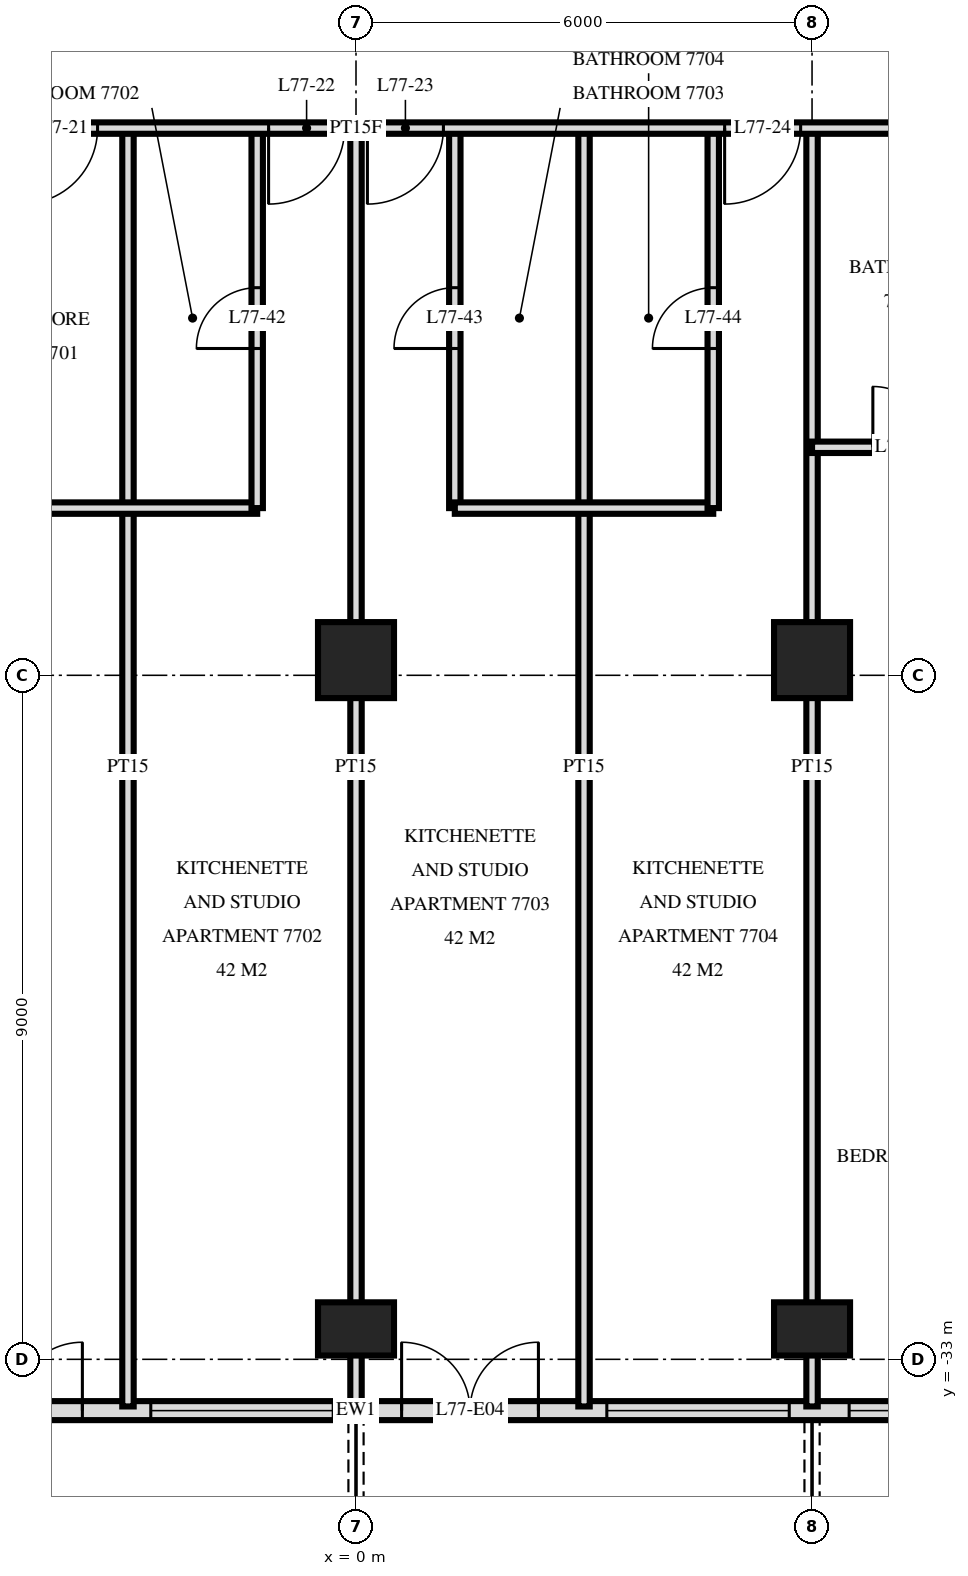
"""IFC4 building model, lengths in metres.
Left out: names, types, materials, properties, quantities, classifications, styles, units other than length and angle.
Written with IfcOpenShell. Run it as: python <this file> out.ifc"""

import sys

from ifc_helpers import new_model, si_unit, direction, frame, frame_2d, origin, origin_2d, place, context, subcontext, project, spatial, rectangle, extrude, element, fill, save


model = new_model("IFC4")
c1 = context("Model", 3, precision=1e-05, world=origin(), true_north=direction((0.0, 1.0)))
c2 = subcontext(c1, "Body", "Model", "MODEL_VIEW")
j1 = project(units=[si_unit("LENGTHUNIT", "METRE"), si_unit("PLANEANGLEUNIT", "RADIAN")], contexts=[c1])
p1 = place(None, origin())
s1 = spatial("IfcSite", under=j1, at=p1, CompositionType="ELEMENT")
p2 = place(p1, origin())
s2 = spatial("IfcBuilding", under=s1, at=p2, CompositionType="ELEMENT")
p3 = place(p2, frame((0.0, 0.0, 291.1)))
s3 = spatial("IfcBuildingStorey", under=s2, at=p3, CompositionType="ELEMENT", Elevation=291.1)
p4 = place(p3, frame((0.0, -32.6, 0.0), z_axis=(0.0, 0.0, 1.0), x_axis=(1.0, 0.0, 0.0)))
e1 = element("IfcColumn", 1, at=p4, inside=s3, PredefinedType="COLUMN", context=c2, shape_type="SweptSolid", body=[
    extrude(rectangle(XDim=1.0, YDim=0.7, at=origin_2d()), origin(), (0.0, 0.0, 1.0), 3.5),
])
p5 = place(p3, frame((0.0, -23.8, 0.0), z_axis=(0.0, 0.0, 1.0), x_axis=(1.0, 0.0, 0.0)))
e2 = element("IfcColumn", 2, at=p5, inside=s3, PredefinedType="COLUMN", context=c2, shape_type="SweptSolid", body=[
    extrude(rectangle(XDim=1.0, YDim=1.0, at=origin_2d()), origin(), (0.0, 0.0, 1.0), 3.5),
])
p6 = place(p3, frame((6.0, -32.6, 0.0), z_axis=(0.0, 0.0, 1.0), x_axis=(1.0, 0.0, 0.0)))
e3 = element("IfcColumn", 3, at=p6, inside=s3, PredefinedType="COLUMN", context=c2, shape_type="SweptSolid", body=[
    extrude(rectangle(XDim=1.0, YDim=0.7, at=origin_2d()), origin(), (0.0, 0.0, 1.0), 3.5),
])
p7 = place(p3, frame((6.0, -23.8, 0.0), z_axis=(0.0, 0.0, 1.0), x_axis=(1.0, 0.0, 0.0)))
e4 = element("IfcColumn", 4, at=p7, inside=s3, PredefinedType="COLUMN", context=c2, shape_type="SweptSolid", body=[
    extrude(rectangle(XDim=1.0, YDim=1.0, at=origin_2d()), origin(), (0.0, 0.0, 1.0), 3.5),
])
p8 = place(p3, frame((-18.575, -33.675, 0.0), z_axis=(0.0, 0.0, 1.0), x_axis=(1.0, 0.0, 0.0)))
e5 = element("IfcWall", 5, at=p8, inside=s3, PredefinedType="SOLIDWALL", context=c2, shape_type="SweptSolid", body=[
    extrude(rectangle(XDim=37.151, YDim=0.25, at=frame_2d((18.575, 0.0))), origin(), (0.0, 0.0, 1.0), 3.22),
])
p9 = place(p8, frame((1.175, 0.0, 0.0)))
e6 = element("IfcOpeningElement", 6, at=p9, cuts=e5, PredefinedType="OPENING", context=c2, shape_type="SweptSolid", body=[
    extrude(rectangle(XDim=1.8, YDim=2.4, at=frame_2d((0.9, 1.2))), frame((0.0, 0.135, 0.0), z_axis=(0.0, -1.0, 0.0), x_axis=(1.0, 0.0, 0.0)), (0.0, 0.0, 1.0), 0.27),
])
p10 = place(p8, frame((4.4, 0.0, 0.9)))
e7 = element("IfcOpeningElement", 7, at=p10, cuts=e5, PredefinedType="OPENING", context=c2, shape_type="SweptSolid", body=[
    extrude(rectangle(XDim=1.8, YDim=1.5, at=frame_2d((0.9, 0.75))), frame((0.0, 0.135, 0.0), z_axis=(0.0, -1.0, 0.0), x_axis=(1.0, 0.0, 0.0)), (0.0, 0.0, 1.0), 0.27),
])
p11 = place(p8, frame((6.875, 0.0, 0.9)))
e8 = element("IfcOpeningElement", 8, at=p11, cuts=e5, PredefinedType="OPENING", context=c2, shape_type="SweptSolid", body=[
    extrude(rectangle(XDim=2.4, YDim=1.5, at=frame_2d((1.2, 0.75))), frame((0.0, 0.135, 0.0), z_axis=(0.0, -1.0, 0.0), x_axis=(1.0, 0.0, 0.0)), (0.0, 0.0, 1.0), 0.27),
])
p12 = place(p8, frame((10.175, 0.0, 0.0)))
e9 = element("IfcOpeningElement", 9, at=p12, cuts=e5, PredefinedType="OPENING", context=c2, shape_type="SweptSolid", body=[
    extrude(rectangle(XDim=1.8, YDim=2.4, at=frame_2d((0.9, 1.2))), frame((0.0, 0.135, 0.0), z_axis=(0.0, -1.0, 0.0), x_axis=(1.0, 0.0, 0.0)), (0.0, 0.0, 1.0), 0.27),
])
p13 = place(p8, frame((13.175, 0.0, 0.0)))
e10 = element("IfcOpeningElement", 10, at=p13, cuts=e5, PredefinedType="OPENING", context=c2, shape_type="SweptSolid", body=[
    extrude(rectangle(XDim=1.8, YDim=2.4, at=frame_2d((0.9, 1.2))), frame((0.0, 0.135, 0.0), z_axis=(0.0, -1.0, 0.0), x_axis=(1.0, 0.0, 0.0)), (0.0, 0.0, 1.0), 0.27),
])
p14 = place(p8, frame((15.875, 0.0, 0.9)))
e11 = element("IfcOpeningElement", 11, at=p14, cuts=e5, PredefinedType="OPENING", context=c2, shape_type="SweptSolid", body=[
    extrude(rectangle(XDim=2.4, YDim=1.5, at=frame_2d((1.2, 0.75))), frame((0.0, 0.135, 0.0), z_axis=(0.0, -1.0, 0.0), x_axis=(1.0, 0.0, 0.0)), (0.0, 0.0, 1.0), 0.27),
])
p15 = place(p8, frame((19.175, 0.0, 0.0)))
e12 = element("IfcOpeningElement", 12, at=p15, cuts=e5, PredefinedType="OPENING", context=c2, shape_type="SweptSolid", body=[
    extrude(rectangle(XDim=1.8, YDim=2.4, at=frame_2d((0.9, 1.2))), frame((0.0, 0.135, 0.0), z_axis=(0.0, -1.0, 0.0), x_axis=(1.0, 0.0, 0.0)), (0.0, 0.0, 1.0), 0.27),
])
p16 = place(p8, frame((21.875, 0.0, 0.9)))
e13 = element("IfcOpeningElement", 13, at=p16, cuts=e5, PredefinedType="OPENING", context=c2, shape_type="SweptSolid", body=[
    extrude(rectangle(XDim=2.4, YDim=1.5, at=frame_2d((1.2, 0.75))), frame((0.0, 0.135, 0.0), z_axis=(0.0, -1.0, 0.0), x_axis=(1.0, 0.0, 0.0)), (0.0, 0.0, 1.0), 0.27),
])
p17 = place(p8, frame((25.063, 0.0, 0.9)))
e14 = element("IfcOpeningElement", 14, at=p17, cuts=e5, PredefinedType="OPENING", context=c2, shape_type="SweptSolid", body=[
    extrude(rectangle(XDim=1.8, YDim=1.5, at=frame_2d((0.9, 0.75))), frame((0.0, 0.135, 0.0), z_axis=(0.0, -1.0, 0.0), x_axis=(1.0, 0.0, 0.0)), (0.0, 0.0, 1.0), 0.27),
])
p18 = place(p8, frame((27.838, 0.0, 0.0)))
e15 = element("IfcOpeningElement", 15, at=p18, cuts=e5, PredefinedType="OPENING", context=c2, shape_type="SweptSolid", body=[
    extrude(rectangle(XDim=1.8, YDim=2.4, at=frame_2d((0.9, 1.2))), frame((0.0, 0.135, 0.0), z_axis=(0.0, -1.0, 0.0), x_axis=(1.0, 0.0, 0.0)), (0.0, 0.0, 1.0), 0.27),
])
p19 = place(p8, frame((31.175, 0.0, 0.0)))
e16 = element("IfcOpeningElement", 16, at=p19, cuts=e5, PredefinedType="OPENING", context=c2, shape_type="SweptSolid", body=[
    extrude(rectangle(XDim=1.8, YDim=2.4, at=frame_2d((0.9, 1.2))), frame((0.0, 0.135, 0.0), z_axis=(0.0, -1.0, 0.0), x_axis=(1.0, 0.0, 0.0)), (0.0, 0.0, 1.0), 0.27),
])
p20 = place(p3, frame((6.0, -33.62, 0.0), z_axis=(0.0, 0.0, 1.0), x_axis=(0.0, 1.0, 0.0)))
e17 = element("IfcWall", 17, at=p20, inside=s3, PredefinedType="PARTITIONING", context=c2, shape_type="SweptSolid", body=[
    extrude(rectangle(XDim=16.82, YDim=0.15, at=frame_2d((8.41, 0.0))), origin(), (0.0, 0.0, 1.0), 3.22),
])
p21 = place(p3, frame((4.7, -21.8, 0.0), z_axis=(0.0, 0.0, 1.0), x_axis=(0.0, 1.0, 0.0)))
e18 = element("IfcWall", 18, at=p21, inside=s3, PredefinedType="PARTITIONING", context=c2, shape_type="SweptSolid", body=[
    extrude(rectangle(XDim=5.0, YDim=0.15, at=frame_2d((2.5, 0.0))), origin(), (0.0, 0.0, 1.0), 3.22),
])
p22 = place(p21, frame((2.1, 0.0, 0.0)))
e19 = element("IfcOpeningElement", 19, at=p22, cuts=e18, PredefinedType="OPENING", context=c2, shape_type="SweptSolid", body=[
    extrude(rectangle(XDim=0.8, YDim=2.1, at=frame_2d((0.4, 1.05))), frame((0.0, 0.085, 0.0), z_axis=(0.0, -1.0, 0.0), x_axis=(1.0, 0.0, 0.0)), (0.0, 0.0, 1.0), 0.17),
])
p23 = place(p3, frame((3.0, -33.62, 0.0), z_axis=(0.0, 0.0, 1.0), x_axis=(0.0, 1.0, 0.0)))
e20 = element("IfcWall", 20, at=p23, inside=s3, PredefinedType="PARTITIONING", context=c2, shape_type="SweptSolid", body=[
    extrude(rectangle(XDim=16.82, YDim=0.15, at=frame_2d((8.41, 0.0))), origin(), (0.0, 0.0, 1.0), 3.22),
])
p24 = place(p3, frame((1.3, -21.8, 0.0), z_axis=(0.0, 0.0, 1.0), x_axis=(0.0, 1.0, 0.0)))
e21 = element("IfcWall", 21, at=p24, inside=s3, PredefinedType="PARTITIONING", context=c2, shape_type="SweptSolid", body=[
    extrude(rectangle(XDim=5.0, YDim=0.15, at=frame_2d((2.5, 0.0))), origin(), (0.0, 0.0, 1.0), 3.22),
])
p25 = place(p24, frame((2.1, 0.0, 0.0)))
e22 = element("IfcOpeningElement", 22, at=p25, cuts=e21, PredefinedType="OPENING", context=c2, shape_type="SweptSolid", body=[
    extrude(rectangle(XDim=0.8, YDim=2.1, at=frame_2d((0.4, 1.05))), frame((0.0, 0.085, 0.0), z_axis=(0.0, -1.0, 0.0), x_axis=(1.0, 0.0, 0.0)), (0.0, 0.0, 1.0), 0.17),
])
p26 = place(p3, frame((0.0, -33.62, 0.0), z_axis=(0.0, 0.0, 1.0), x_axis=(0.0, 1.0, 0.0)))
e23 = element("IfcWall", 23, at=p26, inside=s3, PredefinedType="PARTITIONING", context=c2, shape_type="SweptSolid", body=[
    extrude(rectangle(XDim=16.82, YDim=0.15, at=frame_2d((8.41, 0.0))), origin(), (0.0, 0.0, 1.0), 3.22),
])
p27 = place(p3, frame((-1.3, -21.8, 0.0), z_axis=(0.0, 0.0, 1.0), x_axis=(0.0, 1.0, 0.0)))
e24 = element("IfcWall", 24, at=p27, inside=s3, PredefinedType="PARTITIONING", context=c2, shape_type="SweptSolid", body=[
    extrude(rectangle(XDim=5.0, YDim=0.15, at=frame_2d((2.5, 0.0))), origin(), (0.0, 0.0, 1.0), 3.22),
])
p28 = place(p27, frame((2.1, 0.0, 0.0)))
e25 = element("IfcOpeningElement", 25, at=p28, cuts=e24, PredefinedType="OPENING", context=c2, shape_type="SweptSolid", body=[
    extrude(rectangle(XDim=0.8, YDim=2.1, at=frame_2d((0.4, 1.05))), frame((0.0, 0.085, 0.0), z_axis=(0.0, -1.0, 0.0), x_axis=(1.0, 0.0, 0.0)), (0.0, 0.0, 1.0), 0.17),
])
p29 = place(p3, frame((-3.0, -33.62, 0.0), z_axis=(0.0, 0.0, 1.0), x_axis=(0.0, 1.0, 0.0)))
e26 = element("IfcWall", 26, at=p29, inside=s3, PredefinedType="PARTITIONING", context=c2, shape_type="SweptSolid", body=[
    extrude(rectangle(XDim=16.82, YDim=0.15, at=frame_2d((8.41, 0.0))), origin(), (0.0, 0.0, 1.0), 3.22),
])
p30 = place(p3, frame((-4.8, -21.8, 0.0), z_axis=(0.0, 0.0, 1.0), x_axis=(1.0, 0.0, 0.0)))
e27 = element("IfcWall", 27, at=p30, inside=s3, PredefinedType="PARTITIONING", context=c2, shape_type="SweptSolid", body=[
    extrude(rectangle(XDim=3.5, YDim=0.15, at=frame_2d((1.75, 0.0))), origin(), (0.0, 0.0, 1.0), 3.22),
])
p31 = place(p3, frame((1.3, -21.8, 0.0), z_axis=(0.0, 0.0, 1.0), x_axis=(1.0, 0.0, 0.0)))
e28 = element("IfcWall", 28, at=p31, inside=s3, PredefinedType="PARTITIONING", context=c2, shape_type="SweptSolid", body=[
    extrude(rectangle(XDim=3.4, YDim=0.15, at=frame_2d((1.7, 0.0))), origin(), (0.0, 0.0, 1.0), 3.22),
])
p32 = place(p3, frame((6.0, -21.0, 0.0), z_axis=(0.0, 0.0, 1.0), x_axis=(1.0, 0.0, 0.0)))
e29 = element("IfcWall", 29, at=p32, inside=s3, PredefinedType="PARTITIONING", context=c2, shape_type="SweptSolid", body=[
    extrude(rectangle(XDim=6.0, YDim=0.15, at=frame_2d((3.0, 0.0))), origin(), (0.0, 0.0, 1.0), 3.22),
])
p33 = place(p32, frame((0.8, 0.0, 0.0)))
e30 = element("IfcOpeningElement", 30, at=p33, cuts=e29, PredefinedType="OPENING", context=c2, shape_type="SweptSolid", body=[
    extrude(rectangle(XDim=0.8, YDim=2.1, at=frame_2d((0.4, 1.05))), frame((0.0, 0.085, 0.0), z_axis=(0.0, -1.0, 0.0), x_axis=(1.0, 0.0, 0.0)), (0.0, 0.0, 1.0), 0.17),
])
p34 = place(p3, frame((-22.92, -16.8, 0.0), z_axis=(0.0, 0.0, 1.0), x_axis=(1.0, 0.0, 0.0)))
e31 = element("IfcWall", 31, at=p34, inside=s3, PredefinedType="PARTITIONING", context=c2, shape_type="SweptSolid", body=[
    extrude(rectangle(XDim=45.84, YDim=0.15, at=frame_2d((22.92, 0.0))), origin(), (0.0, 0.0, 1.0), 3.22),
])
p35 = place(p34, frame((16.72, 0.0, 0.0)))
e32 = element("IfcOpeningElement", 32, at=p35, cuts=e31, PredefinedType="OPENING", context=c2, shape_type="SweptSolid", body=[
    extrude(rectangle(XDim=1.0, YDim=2.1, at=frame_2d((0.5, 1.05))), frame((0.0, 0.085, 0.0), z_axis=(0.0, -1.0, 0.0), x_axis=(1.0, 0.0, 0.0)), (0.0, 0.0, 1.0), 0.17),
])
p36 = place(p34, frame((18.52, 0.0, 0.0)))
e33 = element("IfcOpeningElement", 33, at=p36, cuts=e31, PredefinedType="OPENING", context=c2, shape_type="SweptSolid", body=[
    extrude(rectangle(XDim=1.0, YDim=2.1, at=frame_2d((0.5, 1.05))), frame((0.0, 0.085, 0.0), z_axis=(0.0, -1.0, 0.0), x_axis=(1.0, 0.0, 0.0)), (0.0, 0.0, 1.0), 0.17),
])
p37 = place(p34, frame((21.77, 0.0, 0.0)))
e34 = element("IfcOpeningElement", 34, at=p37, cuts=e31, PredefinedType="OPENING", context=c2, shape_type="SweptSolid", body=[
    extrude(rectangle(XDim=1.0, YDim=2.1, at=frame_2d((0.5, 1.05))), frame((0.0, 0.085, 0.0), z_axis=(0.0, -1.0, 0.0), x_axis=(1.0, 0.0, 0.0)), (0.0, 0.0, 1.0), 0.17),
])
p38 = place(p34, frame((23.07, 0.0, 0.0)))
e35 = element("IfcOpeningElement", 35, at=p38, cuts=e31, PredefinedType="OPENING", context=c2, shape_type="SweptSolid", body=[
    extrude(rectangle(XDim=1.0, YDim=2.1, at=frame_2d((0.5, 1.05))), frame((0.0, 0.085, 0.0), z_axis=(0.0, -1.0, 0.0), x_axis=(1.0, 0.0, 0.0)), (0.0, 0.0, 1.0), 0.17),
])
p39 = place(p34, frame((27.77, 0.0, 0.0)))
e36 = element("IfcOpeningElement", 36, at=p39, cuts=e31, PredefinedType="OPENING", context=c2, shape_type="SweptSolid", body=[
    extrude(rectangle(XDim=1.0, YDim=2.1, at=frame_2d((0.5, 1.05))), frame((0.0, 0.085, 0.0), z_axis=(0.0, -1.0, 0.0), x_axis=(1.0, 0.0, 0.0)), (0.0, 0.0, 1.0), 0.17),
])
p40 = place(p34, frame((7.02, 0.0, 0.0)))
e37 = element("IfcOpeningElement", 37, at=p40, cuts=e31, PredefinedType="OPENING", context=c2, shape_type="SweptSolid", body=[
    extrude(rectangle(XDim=1.0, YDim=2.1, at=frame_2d((0.5, 1.05))), frame((0.0, 0.085, 0.0), z_axis=(0.0, -1.0, 0.0), x_axis=(1.0, 0.0, 0.0)), (0.0, 0.0, 1.0), 0.17),
])
p41 = place(p34, frame((35.42, 0.0, 0.0)))
e38 = element("IfcOpeningElement", 38, at=p41, cuts=e31, PredefinedType="OPENING", context=c2, shape_type="SweptSolid", body=[
    extrude(rectangle(XDim=1.0, YDim=2.1, at=frame_2d((0.5, 1.05))), frame((0.0, 0.085, 0.0), z_axis=(0.0, -1.0, 0.0), x_axis=(1.0, 0.0, 0.0)), (0.0, 0.0, 1.0), 0.17),
])
p42 = place(p34, frame((42.19, 0.0, 0.0)))
e39 = element("IfcOpeningElement", 39, at=p42, cuts=e31, PredefinedType="OPENING", context=c2, shape_type="SweptSolid", body=[
    extrude(rectangle(XDim=1.0, YDim=2.1, at=frame_2d((0.5, 1.05))), frame((0.0, 0.085, 0.0), z_axis=(0.0, -1.0, 0.0), x_axis=(1.0, 0.0, 0.0)), (0.0, 0.0, 1.0), 0.17),
])
p43 = place(p13, origin())
e40 = element("IfcDoor", 40, at=p43, inside=s3, OperationType="DOUBLE_DOOR_SINGLE_SWING", PredefinedType="DOOR", context=c2, shape_type="SweptSolid", body=[
    extrude(rectangle(XDim=1.8, YDim=2.4, at=frame_2d((0.9, 1.2))), frame((0.0, 0.025, 0.0), z_axis=(0.0, -1.0, 0.0), x_axis=(1.0, 0.0, 0.0)), (0.0, 0.0, 1.0), 0.05),
])
fill(e10, e40)
p44 = place(p14, origin())
e41 = element("IfcWindow", 41, at=p44, inside=s3, PartitioningType="SINGLE_PANEL", PredefinedType="WINDOW", context=c2, shape_type="SweptSolid", body=[
    extrude(rectangle(XDim=2.4, YDim=1.5, at=frame_2d((1.2, 0.75))), frame((0.0, 0.03, 0.0), z_axis=(0.0, -1.0, 0.0), x_axis=(1.0, 0.0, 0.0)), (0.0, 0.0, 1.0), 0.06),
])
fill(e11, e41)
p45 = place(p15, origin())
e42 = element("IfcDoor", 42, at=p45, inside=s3, OperationType="DOUBLE_DOOR_SINGLE_SWING", PredefinedType="DOOR", context=c2, shape_type="SweptSolid", body=[
    extrude(rectangle(XDim=1.8, YDim=2.4, at=frame_2d((0.9, 1.2))), frame((0.0, 0.025, 0.0), z_axis=(0.0, -1.0, 0.0), x_axis=(1.0, 0.0, 0.0)), (0.0, 0.0, 1.0), 0.05),
])
fill(e12, e42)
p46 = place(p16, origin())
e43 = element("IfcWindow", 43, at=p46, inside=s3, PartitioningType="SINGLE_PANEL", PredefinedType="WINDOW", context=c2, shape_type="SweptSolid", body=[
    extrude(rectangle(XDim=2.4, YDim=1.5, at=frame_2d((1.2, 0.75))), frame((0.0, 0.03, 0.0), z_axis=(0.0, -1.0, 0.0), x_axis=(1.0, 0.0, 0.0)), (0.0, 0.0, 1.0), 0.06),
])
fill(e13, e43)
p47 = place(p17, origin())
e44 = element("IfcWindow", 44, at=p47, inside=s3, PartitioningType="SINGLE_PANEL", PredefinedType="WINDOW", context=c2, shape_type="SweptSolid", body=[
    extrude(rectangle(XDim=1.8, YDim=1.5, at=frame_2d((0.9, 0.75))), frame((0.0, 0.03, 0.0), z_axis=(0.0, -1.0, 0.0), x_axis=(1.0, 0.0, 0.0)), (0.0, 0.0, 1.0), 0.06),
])
fill(e14, e44)
p48 = place(p36, frame((0.5, 0.0, 0.0), z_axis=(0.0, 0.0, 1.0), x_axis=(-1.0, 0.0, 0.0)))
e45 = element("IfcDoor", 45, at=p48, inside=s3, OperationType="SINGLE_SWING_LEFT", PredefinedType="DOOR", context=c2, shape_type="SweptSolid", body=[
    extrude(rectangle(XDim=1.0, YDim=2.1, at=frame_2d((0.0, 1.05))), frame((0.0, -0.025, 0.0), z_axis=(0.0, 1.0, 0.0), x_axis=(-1.0, 0.0, 0.0)), (0.0, 0.0, 1.0), 0.05),
])
fill(e33, e45)
p49 = place(p37, frame((0.5, 0.0, 0.0), z_axis=(0.0, 0.0, 1.0), x_axis=(-1.0, 0.0, 0.0)))
e46 = element("IfcDoor", 46, at=p49, inside=s3, OperationType="SINGLE_SWING_LEFT", PredefinedType="DOOR", context=c2, shape_type="SweptSolid", body=[
    extrude(rectangle(XDim=1.0, YDim=2.1, at=frame_2d((0.0, 1.05))), frame((0.0, -0.025, 0.0), z_axis=(0.0, 1.0, 0.0), x_axis=(-1.0, 0.0, 0.0)), (0.0, 0.0, 1.0), 0.05),
])
fill(e34, e46)
p50 = place(p38, frame((0.5, 0.0, 0.0), z_axis=(0.0, 0.0, 1.0), x_axis=(-1.0, 0.0, 0.0)))
e47 = element("IfcDoor", 47, at=p50, inside=s3, OperationType="SINGLE_SWING_LEFT", PredefinedType="DOOR", context=c2, shape_type="SweptSolid", body=[
    extrude(rectangle(XDim=1.0, YDim=2.1, at=frame_2d((0.0, 1.05))), frame((0.0, -0.025, 0.0), z_axis=(0.0, 1.0, 0.0), x_axis=(-1.0, 0.0, 0.0)), (0.0, 0.0, 1.0), 0.05),
])
fill(e35, e47)
p51 = place(p39, frame((0.5, 0.0, 0.0), z_axis=(0.0, 0.0, 1.0), x_axis=(-1.0, 0.0, 0.0)))
e48 = element("IfcDoor", 48, at=p51, inside=s3, OperationType="SINGLE_SWING_LEFT", PredefinedType="DOOR", context=c2, shape_type="SweptSolid", body=[
    extrude(rectangle(XDim=1.0, YDim=2.1, at=frame_2d((0.0, 1.05))), frame((0.0, -0.025, 0.0), z_axis=(0.0, 1.0, 0.0), x_axis=(-1.0, 0.0, 0.0)), (0.0, 0.0, 1.0), 0.05),
])
fill(e36, e48)
p52 = place(p28, origin())
e49 = element("IfcDoor", 49, at=p52, inside=s3, OperationType="SINGLE_SWING_RIGHT", PredefinedType="DOOR", context=c2, shape_type="SweptSolid", body=[
    extrude(rectangle(XDim=0.8, YDim=2.1, at=frame_2d((0.4, 1.05))), frame((0.0, 0.025, 0.0), z_axis=(0.0, -1.0, 0.0), x_axis=(1.0, 0.0, 0.0)), (0.0, 0.0, 1.0), 0.05),
])
fill(e25, e49)
p53 = place(p25, origin())
e50 = element("IfcDoor", 50, at=p53, inside=s3, OperationType="SINGLE_SWING_RIGHT", PredefinedType="DOOR", context=c2, shape_type="SweptSolid", body=[
    extrude(rectangle(XDim=0.8, YDim=2.1, at=frame_2d((0.4, 1.05))), frame((0.0, 0.025, 0.0), z_axis=(0.0, -1.0, 0.0), x_axis=(1.0, 0.0, 0.0)), (0.0, 0.0, 1.0), 0.05),
])
fill(e22, e50)
p54 = place(p22, origin())
e51 = element("IfcDoor", 51, at=p54, inside=s3, OperationType="SINGLE_SWING_RIGHT", PredefinedType="DOOR", context=c2, shape_type="SweptSolid", body=[
    extrude(rectangle(XDim=0.8, YDim=2.1, at=frame_2d((0.4, 1.05))), frame((0.0, 0.025, 0.0), z_axis=(0.0, -1.0, 0.0), x_axis=(1.0, 0.0, 0.0)), (0.0, 0.0, 1.0), 0.05),
])
fill(e19, e51)
p55 = place(p33, origin())
e52 = element("IfcDoor", 52, at=p55, inside=s3, OperationType="SINGLE_SWING_RIGHT", PredefinedType="DOOR", context=c2, shape_type="SweptSolid", body=[
    extrude(rectangle(XDim=0.8, YDim=2.1, at=frame_2d((0.4, 1.05))), frame((0.0, 0.025, 0.0), z_axis=(0.0, -1.0, 0.0), x_axis=(1.0, 0.0, 0.0)), (0.0, 0.0, 1.0), 0.05),
])
fill(e30, e52)
save(model, sys.argv[1])
